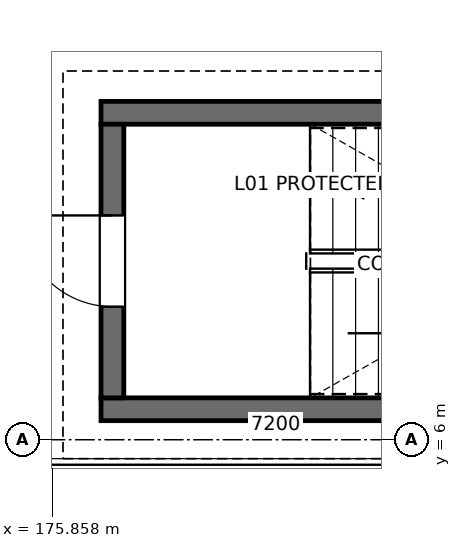
"""IFC4 building model, lengths in metres.
Left out: names, types, materials, properties, quantities, classifications, styles, units other than length and angle.
Written with IfcOpenShell. Run it as: python <this file> out.ifc"""

import sys

from ifc_helpers import new_model, si_unit, direction, frame, frame_2d, origin, place, context, subcontext, project, spatial, rectangle, extrude, element, fill, save


model = new_model("IFC4")
c1 = context("Model", 3, precision=1e-05, world=origin(), true_north=direction((0.0, 1.0)))
c2 = subcontext(c1, "Body", "Model", "MODEL_VIEW")
j1 = project(units=[si_unit("LENGTHUNIT", "METRE"), si_unit("PLANEANGLEUNIT", "RADIAN")], contexts=[c1])
p1 = place(None, origin())
s1 = spatial("IfcSite", under=j1, at=p1, CompositionType="ELEMENT")
p2 = place(p1, origin())
s2 = spatial("IfcBuilding", under=s1, at=p2, CompositionType="ELEMENT")
p3 = place(p2, frame((0.0, 0.0, 5.4)))
s3 = spatial("IfcBuildingStorey", under=s2, at=p3, CompositionType="ELEMENT", Elevation=5.4)
for number, where, z_axis, x_axis in (
    (1, (185.9, 6.4, 0.0), (0.0, 0.0, 1.0), (-1.0, 0.0, 0.0)),
    (2, (176.5, 10.3, 0.0), (0.0, 0.0, 1.0), (1.0, 0.0, 0.0)),
):
    element("IfcWall", number, at=place(p3, frame(where, z_axis=z_axis, x_axis=x_axis)), inside=s3, PredefinedType="SOLIDWALL", context=c2, shape_type="SweptSolid", body=[
        extrude(rectangle(XDim=9.4, YDim=0.3, at=frame_2d((4.7, 0.0))), origin(), (0.0, 0.0, 1.0), 3.67),
    ])
p4 = place(p3, frame((176.65, 6.55, 0.0), z_axis=(0.0, 0.0, 1.0), x_axis=(0.0, 1.0, 0.0)))
e3 = element("IfcWall", 3, at=p4, inside=s3, PredefinedType="SOLIDWALL", context=c2, shape_type="SweptSolid", body=[
    extrude(rectangle(XDim=3.6, YDim=0.3, at=frame_2d((1.8, 0.0))), origin(), (0.0, 0.0, 1.0), 3.67),
])
p5 = place(p4, frame((1.2, 0.0, 0.0)))
e4 = element("IfcOpeningElement", 4, at=p5, cuts=e3, PredefinedType="OPENING", context=c2, shape_type="SweptSolid", body=[
    extrude(rectangle(XDim=1.2, YDim=2.2, at=frame_2d((0.6, 1.1))), frame((0.0, 0.16, 0.0), z_axis=(0.0, -1.0, 0.0), x_axis=(1.0, 0.0, 0.0)), (0.0, 0.0, 1.0), 0.32),
])
p6 = place(p5, origin())
e5 = element("IfcDoor", 5, at=p6, inside=s3, OperationType="SINGLE_SWING_RIGHT", PredefinedType="DOOR", context=c2, shape_type="SweptSolid", body=[
    extrude(rectangle(XDim=1.2, YDim=2.2, at=frame_2d((0.6, 1.1))), frame((0.0, 0.025, 0.0), z_axis=(0.0, -1.0, 0.0), x_axis=(1.0, 0.0, 0.0)), (0.0, 0.0, 1.0), 0.05),
])
fill(e4, e5)
save(model, sys.argv[1])
